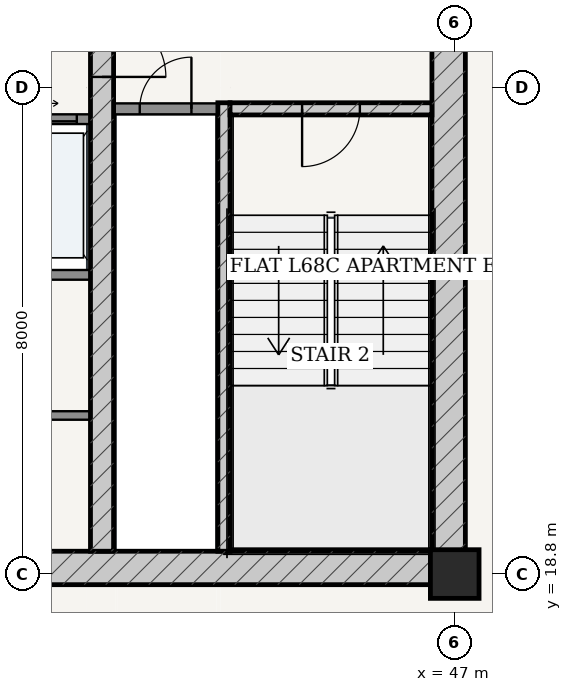
"""IFC4 building model, lengths in metres.
Left out: names, types, materials, properties, quantities, classifications, styles, units other than length and angle.
Written with IfcOpenShell. Run it as: python <this file> out.ifc"""

import sys

from ifc_helpers import new_model, si_unit, direction, frame, frame_2d, origin, origin_2d, place, context, subcontext, project, spatial, rectangle, extrude, source, transform, mapped, element, fill, save


model = new_model("IFC4")
c1 = context("Model", 3, precision=1e-05, world=origin(), true_north=direction((-0.2419218956, 0.970295726276)))
c2 = subcontext(c1, "Body", "Model", "MODEL_VIEW")
j1 = project(units=[si_unit("LENGTHUNIT", "METRE"), si_unit("PLANEANGLEUNIT", "RADIAN")], contexts=[c1])
p1 = place(None, origin())
s1 = spatial("IfcSite", under=j1, at=p1, CompositionType="ELEMENT")
p2 = place(p1, origin())
s2 = spatial("IfcBuilding", under=s1, at=p2, CompositionType="ELEMENT")
p3 = place(p2, frame((0.0, 0.0, 259.45)))
s3 = spatial("IfcBuildingStorey", under=s2, at=p3, CompositionType="ELEMENT", Elevation=259.45)
p4 = place(p3, frame((47.0, 18.8, 0.0), z_axis=(0.0, 0.0, 1.0), x_axis=(1.0, 0.0, 0.0)))
e1 = element("IfcColumn", 1, at=p4, inside=s3, PredefinedType="COLUMN", context=c2, shape_type="SweptSolid", body=[
    extrude(rectangle(XDim=0.8, YDim=0.8, at=origin_2d()), origin(), (0.0, 0.0, 1.0), 3.75),
])
p5 = place(p3, frame((28.825, 18.9, 0.0), z_axis=(0.0, 0.0, 1.0), x_axis=(1.0, 0.0, 0.0)))
e2 = element("IfcWall", 2, at=p5, inside=s3, PredefinedType="SHEAR", context=c2, shape_type="SweptSolid", body=[
    extrude(rectangle(XDim=18.35, YDim=0.55, at=frame_2d((9.175, 0.0))), origin(), (0.0, 0.0, 1.0), 3.49),
])
p6 = place(p5, frame((8.75, 0.0, 0.0)))
e3 = element("IfcOpeningElement", 3, at=p6, cuts=e2, PredefinedType="OPENING", context=c2, shape_type="SweptSolid", body=[
    extrude(rectangle(XDim=0.85, YDim=2.1, at=frame_2d((0.425, 1.05))), frame((0.0, 0.285, 0.0), z_axis=(0.0, -1.0, 0.0), x_axis=(1.0, 0.0, 0.0)), (0.0, 0.0, 1.0), 0.57),
])
p7 = place(p3, frame((46.9, 19.175, 0.0), z_axis=(0.0, 0.0, 1.0), x_axis=(0.0, 1.0, 0.0)))
e4 = element("IfcWall", 4, at=p7, inside=s3, PredefinedType="SHEAR", context=c2, shape_type="SweptSolid", body=[
    extrude(rectangle(XDim=15.25, YDim=0.55, at=frame_2d((7.625, 0.0))), origin(), (0.0, 0.0, 1.0), 3.49),
])
p8 = place(p7, frame((9.875, 0.0, 0.0)))
e5 = element("IfcOpeningElement", 5, at=p8, cuts=e4, PredefinedType="OPENING", context=c2, shape_type="SweptSolid", body=[
    extrude(rectangle(XDim=1.5, YDim=2.2, at=frame_2d((0.75, 1.1))), frame((0.0, 0.285, 0.0), z_axis=(0.0, -1.0, 0.0), x_axis=(1.0, 0.0, 0.0)), (0.0, 0.0, 1.0), 0.57),
])
p9 = place(p3, frame((43.205, 19.175, 0.0), z_axis=(0.0, 0.0, 1.0), x_axis=(0.0, 1.0, 0.0)))
e6 = element("IfcWall", 6, at=p9, inside=s3, PredefinedType="SOLIDWALL", context=c2, shape_type="SweptSolid", body=[
    extrude(rectangle(XDim=7.375, YDim=0.2, at=frame_2d((3.688, 0.0))), origin(), (0.0, 0.0, 1.0), 3.49),
])
p10 = place(p3, frame((43.305, 26.45, 0.0), z_axis=(0.0, 0.0, 1.0), x_axis=(1.0, 0.0, 0.0)))
e7 = element("IfcWall", 7, at=p10, inside=s3, PredefinedType="SOLIDWALL", context=c2, shape_type="SweptSolid", body=[
    extrude(rectangle(XDim=3.32, YDim=0.2, at=frame_2d((1.66, 0.0))), origin(), (0.0, 0.0, 1.0), 3.49),
])
p11 = place(p10, frame((1.185, 0.0, 0.0)))
e8 = element("IfcOpeningElement", 8, at=p11, cuts=e7, PredefinedType="OPENING", context=c2, shape_type="SweptSolid", body=[
    extrude(rectangle(XDim=0.95, YDim=2.15, at=frame_2d((0.475, 1.075))), frame((0.0, 0.11, 0.0), z_axis=(0.0, -1.0, 0.0), x_axis=(1.0, 0.0, 0.0)), (0.0, 0.0, 1.0), 0.22),
])
p12 = place(p3, frame((41.2, 19.175, 0.0), z_axis=(0.0, 0.0, 1.0), x_axis=(0.0, 1.0, 0.0)))
e9 = element("IfcWall", 9, at=p12, inside=s3, PredefinedType="SHEAR", context=c2, shape_type="SweptSolid", body=[
    extrude(rectangle(XDim=15.25, YDim=0.38, at=frame_2d((7.625, 0.0))), origin(), (0.0, 0.0, 1.0), 3.49),
])
p13 = place(p12, frame((7.8, 0.0, 0.0)))
e10 = element("IfcOpeningElement", 10, at=p13, cuts=e9, PredefinedType="OPENING", context=c2, shape_type="SweptSolid", body=[
    extrude(rectangle(XDim=1.05, YDim=2.15, at=frame_2d((0.525, 1.075))), frame((0.0, 0.2, 0.0), z_axis=(0.0, -1.0, 0.0), x_axis=(1.0, 0.0, 0.0)), (0.0, 0.0, 1.0), 0.4),
])
p14 = place(p3, frame((41.39, 26.45, 0.0), z_axis=(0.0, 0.0, 1.0), x_axis=(1.0, 0.0, 0.0)))
e11 = element("IfcWall", 11, at=p14, inside=s3, PredefinedType="PARTITIONING", context=c2, shape_type="SweptSolid", body=[
    extrude(rectangle(XDim=1.71, YDim=0.18, at=frame_2d((0.855, 0.0))), origin(), (0.0, 0.0, 1.0), 3.49),
])
p15 = place(p14, frame((0.43, 0.0, 0.0)))
e12 = element("IfcOpeningElement", 12, at=p15, cuts=e11, PredefinedType="OPENING", context=c2, shape_type="SweptSolid", body=[
    extrude(rectangle(XDim=0.85, YDim=2.1, at=frame_2d((0.425, 1.05))), frame((0.0, 0.1, 0.0), z_axis=(0.0, -1.0, 0.0), x_axis=(1.0, 0.0, 0.0)), (0.0, 0.0, 1.0), 0.2),
])
p16 = place(p3, frame((34.99, 26.28, 0.0), z_axis=(0.0, 0.0, 1.0), x_axis=(1.0, 0.0, 0.0)))
e13 = element("IfcWall", 13, at=p16, inside=s3, PredefinedType="PARTITIONING", context=c2, shape_type="SweptSolid", body=[
    extrude(rectangle(XDim=6.02, YDim=0.16, at=frame_2d((3.01, 0.0))), origin(), (0.0, 0.0, 1.0), 3.49),
])
p17 = place(p16, frame((1.045, 0.0, 0.0)))
e14 = element("IfcOpeningElement", 14, at=p17, cuts=e13, PredefinedType="OPENING", context=c2, shape_type="SweptSolid", body=[
    extrude(rectangle(XDim=0.85, YDim=2.1, at=frame_2d((0.425, 1.05))), frame((0.0, 0.09, 0.0), z_axis=(0.0, -1.0, 0.0), x_axis=(1.0, 0.0, 0.0)), (0.0, 0.0, 1.0), 0.18),
])
p18 = place(p16, frame((3.215, 0.0, 0.0)))
e15 = element("IfcOpeningElement", 15, at=p18, cuts=e13, PredefinedType="OPENING", context=c2, shape_type="SweptSolid", body=[
    extrude(rectangle(XDim=1.1, YDim=2.2, at=frame_2d((0.55, 1.1))), frame((0.0, 0.09, 0.0), z_axis=(0.0, -1.0, 0.0), x_axis=(1.0, 0.0, 0.0)), (0.0, 0.0, 1.0), 0.18),
])
p19 = place(p16, frame((4.695, 0.0, 0.0)))
e16 = element("IfcOpeningElement", 16, at=p19, cuts=e13, PredefinedType="OPENING", context=c2, shape_type="SweptSolid", body=[
    extrude(rectangle(XDim=1.1, YDim=2.2, at=frame_2d((0.55, 1.1))), frame((0.0, 0.09, 0.0), z_axis=(0.0, -1.0, 0.0), x_axis=(1.0, 0.0, 0.0)), (0.0, 0.0, 1.0), 0.18),
])
p20 = place(p3, frame((34.99, 23.72, 0.0), z_axis=(0.0, 0.0, 1.0), x_axis=(1.0, 0.0, 0.0)))
e17 = element("IfcWall", 17, at=p20, inside=s3, PredefinedType="PARTITIONING", context=c2, shape_type="SweptSolid", body=[
    extrude(rectangle(XDim=6.02, YDim=0.16, at=frame_2d((3.01, 0.0))), origin(), (0.0, 0.0, 1.0), 3.49),
])
p21 = place(p3, frame((34.99, 21.407, 0.0), z_axis=(0.0, 0.0, 1.0), x_axis=(1.0, 0.0, 0.0)))
e18 = element("IfcWall", 18, at=p21, inside=s3, PredefinedType="PARTITIONING", context=c2, shape_type="SweptSolid", body=[
    extrude(rectangle(XDim=6.02, YDim=0.14, at=frame_2d((3.01, 0.0))), origin(), (0.0, 0.0, 1.0), 3.49),
])
p22 = place(p21, frame((2.585, 0.0, 0.0)))
e19 = element("IfcOpeningElement", 19, at=p22, cuts=e18, PredefinedType="OPENING", context=c2, shape_type="SweptSolid", body=[
    extrude(rectangle(XDim=0.85, YDim=2.1, at=frame_2d((0.425, 1.05))), frame((0.0, 0.08, 0.0), z_axis=(0.0, -1.0, 0.0), x_axis=(1.0, 0.0, 0.0)), (0.0, 0.0, 1.0), 0.16),
])
m1 = source(origin(), c2, "Body", "SweptSolid", [
    extrude(rectangle(XDim=1.05, YDim=2.15, at=frame_2d((0.525, 1.075))), frame((0.0, 0.025, 0.0), z_axis=(0.0, -1.0, 0.0), x_axis=(1.0, 0.0, 0.0)), (0.0, 0.0, 1.0), 0.05),
])
p23 = place(p13, frame((1.05, 0.0, 0.0), z_axis=(0.0, 0.0, 1.0), x_axis=(-1.0, 0.0, 0.0)))
e20 = element("IfcDoor", 20, at=p23, inside=s3, OperationType="SINGLE_SWING_RIGHT", PredefinedType="DOOR", context=c2, shape_type="MappedRepresentation", body=[
    mapped(m1, transform((0.0, 0.0, 0.0), scale=1.0)),
])
fill(e10, e20)
m2 = source(origin(), c2, "Body", "SweptSolid", [
    extrude(rectangle(XDim=0.95, YDim=2.15, at=frame_2d((0.475, 1.075))), frame((0.0, 0.025, 0.0), z_axis=(0.0, -1.0, 0.0), x_axis=(1.0, 0.0, 0.0)), (0.0, 0.0, 1.0), 0.05),
])
p24 = place(p11, frame((0.95, 0.0, 0.0), z_axis=(0.0, 0.0, 1.0), x_axis=(-1.0, 0.0, 0.0)))
e21 = element("IfcDoor", 21, at=p24, inside=s3, OperationType="SINGLE_SWING_RIGHT", PredefinedType="DOOR", context=c2, shape_type="MappedRepresentation", body=[
    mapped(m2, transform((0.0, 0.0, 0.0), scale=1.0)),
])
fill(e8, e21)
m3 = source(origin(), c2, "Body", "SweptSolid", [
    extrude(rectangle(XDim=0.85, YDim=2.1, at=frame_2d((0.425, 1.05))), frame((0.0, 0.025, 0.0), z_axis=(0.0, -1.0, 0.0), x_axis=(1.0, 0.0, 0.0)), (0.0, 0.0, 1.0), 0.05),
])
p25 = place(p15, origin())
e22 = element("IfcDoor", 22, at=p25, inside=s3, OperationType="SINGLE_SWING_RIGHT", PredefinedType="DOOR", context=c2, shape_type="MappedRepresentation", body=[
    mapped(m3, transform((0.0, 0.0, 0.0), scale=1.0)),
])
fill(e12, e22)
m4 = source(origin(), c2, "Body", "SweptSolid", [
    extrude(rectangle(XDim=1.1, YDim=2.2, at=frame_2d((0.55, 1.1))), frame((0.0, 0.025, 0.0), z_axis=(0.0, -1.0, 0.0), x_axis=(1.0, 0.0, 0.0)), (0.0, 0.0, 1.0), 0.05),
])
p26 = place(p19, origin())
e23 = element("IfcDoor", 23, at=p26, inside=s3, OperationType="DOUBLE_DOOR_SLIDING", PredefinedType="DOOR", context=c2, shape_type="MappedRepresentation", body=[
    mapped(m4, transform((0.0, 0.0, 0.0), scale=1.0)),
])
fill(e16, e23)
save(model, sys.argv[1])
